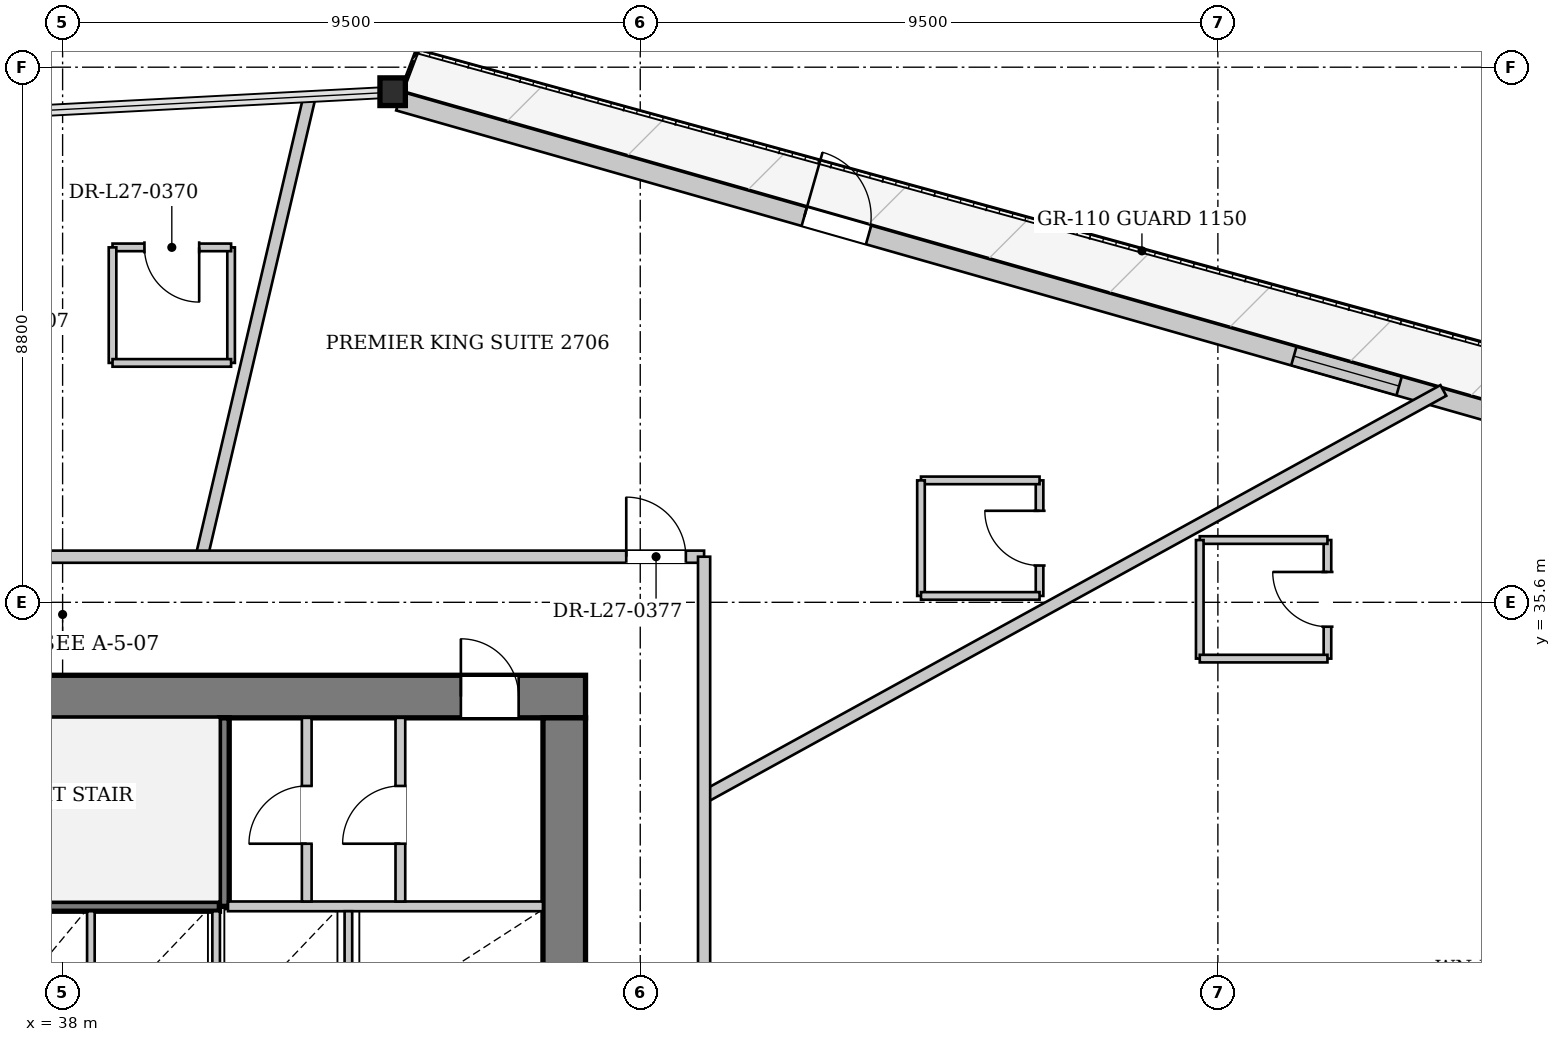
"""IFC4 building model, lengths in metres.
Left out: names, types, materials, properties, quantities, classifications, styles, units other than length and angle.
Written with IfcOpenShell. Run it as: python <this file> out.ifc"""

import sys

from ifc_helpers import new_model, si_unit, direction, frame, frame_2d, origin, origin_2d, place, context, subcontext, project, spatial, rectangle, i_section, extrude, source, transform, mapped, element, fill, save


model = new_model("IFC4")
c1 = context("Model", 3, precision=1e-05, world=origin(), true_north=direction((0.0, 1.0)))
c2 = subcontext(c1, "Body", "Model", "MODEL_VIEW")
j1 = project(units=[si_unit("LENGTHUNIT", "METRE"), si_unit("PLANEANGLEUNIT", "RADIAN")], contexts=[c1])
p1 = place(None, origin())
s1 = spatial("IfcSite", under=j1, at=p1, CompositionType="ELEMENT")
p2 = place(p1, origin())
s2 = spatial("IfcBuilding", under=s1, at=p2, CompositionType="ELEMENT")
p3 = place(p2, frame((0.0, 0.0, 105.7)))
s3 = spatial("IfcBuildingStorey", under=s2, at=p3, CompositionType="ELEMENT", Elevation=105.7)
m1 = source(origin(), c2, "Body", "SweptSolid", [
    extrude(i_section(OverallWidth=0.418, OverallDepth=0.455, WebThickness=0.038, FlangeThickness=0.059, at=origin_2d()), origin(), (0.0, 0.0, 1.0), 3.397),
])
p4 = place(p3, frame((43.573, 43.997, 0.0), z_axis=(-0.085727236226, 0.000143717077, 0.996318633929), x_axis=(-0.001676443579, -0.999998594767, 0.0)))
e1 = element("IfcColumn", 1, at=p4, inside=s3, PredefinedType="COLUMN", context=c2, shape_type="MappedRepresentation", body=[
    mapped(m1, transform((0.0, 0.0, 0.0), x_axis=(1.0, 0.0, 0.0), y_axis=(0.0, 1.0, 0.0), z_axis=(0.0, 0.0, 1.0), scale=1.0)),
])
p5 = place(p3, frame((43.53, 43.843, 0.0), z_axis=(0.0, 0.0, 1.0), x_axis=(0.961735223094, -0.273980584458, 0.0)))
e2 = element("IfcWall", 2, at=p5, inside=s3, PredefinedType="SOLIDWALL", context=c2, shape_type="SweptSolid", body=[
    extrude(rectangle(XDim=23.385, YDim=0.32, at=frame_2d((11.692, 0.0))), origin(), (0.0, 0.0, 1.0), 2.692),
])
p6 = place(p5, frame((6.933, 0.0, 0.0)))
e3 = element("IfcOpeningElement", 3, at=p6, cuts=e2, PredefinedType="OPENING", context=c2, shape_type="SweptSolid", body=[
    extrude(rectangle(XDim=1.1, YDim=2.3, at=frame_2d((0.55, 1.15))), frame((0.0, 0.17, 0.0), z_axis=(0.0, -1.0, 0.0), x_axis=(1.0, 0.0, 0.0)), (0.0, 0.0, 1.0), 0.34),
])
p7 = place(p5, frame((15.305, 0.0, 0.372)))
e4 = element("IfcOpeningElement", 4, at=p7, cuts=e2, PredefinedType="OPENING", context=c2, shape_type="SweptSolid", body=[
    extrude(rectangle(XDim=1.8, YDim=2.2, at=frame_2d((0.9, 1.1))), frame((0.0, 0.17, 0.0), z_axis=(0.0, -1.0, 0.0), x_axis=(1.0, 0.0, 0.0)), (0.0, 0.0, 1.0), 0.34),
])
p8 = place(p3, frame((67.109, 33.873, 0.0), z_axis=(0.0, 0.0, 1.0), x_axis=(-0.640571779822, -0.767898297234, 0.0)))
e5 = element("IfcWall", 5, at=p8, inside=s3, PredefinedType="SOLIDWALL", context=c2, shape_type="SweptSolid", body=[
    extrude(rectangle(XDim=23.985, YDim=0.38, at=frame_2d((11.993, 0.0))), origin(), (0.0, 0.0, 1.0), 2.692),
])
p9 = place(p8, frame((5.616, 0.0, 0.322)))
e6 = element("IfcOpeningElement", 6, at=p9, cuts=e5, PredefinedType="OPENING", context=c2, shape_type="SweptSolid", body=[
    extrude(rectangle(XDim=2.2, YDim=2.25, at=frame_2d((1.1, 1.125))), frame((0.0, 0.2, 0.0), z_axis=(0.0, -1.0, 0.0), x_axis=(1.0, 0.0, 0.0)), (0.0, 0.0, 1.0), 0.4),
])
p10 = place(p8, frame((16.169, 0.0, 0.322)))
e7 = element("IfcOpeningElement", 7, at=p10, cuts=e5, PredefinedType="OPENING", context=c2, shape_type="SweptSolid", body=[
    extrude(rectangle(XDim=2.2, YDim=2.25, at=frame_2d((1.1, 1.125))), frame((0.0, 0.2, 0.0), z_axis=(0.0, -1.0, 0.0), x_axis=(1.0, 0.0, 0.0)), (0.0, 0.0, 1.0), 0.4),
])
p11 = place(p3, frame((29.4, 34.05, 0.0), z_axis=(0.0, 0.0, 1.0), x_axis=(1.0, 0.0, 0.0)))
e8 = element("IfcWall", 8, at=p11, inside=s3, PredefinedType="SHEAR", context=c2, shape_type="SweptSolid", body=[
    extrude(rectangle(XDim=17.2, YDim=0.7, at=frame_2d((8.6, 0.0))), origin(), (0.0, 0.0, 1.0), 3.3),
])
p12 = place(p11, frame((1.7, 0.0, 0.0)))
e9 = element("IfcOpeningElement", 9, at=p12, cuts=e8, PredefinedType="OPENING", context=c2, shape_type="SweptSolid", body=[
    extrude(rectangle(XDim=0.95, YDim=2.1, at=frame_2d((0.475, 1.05))), frame((0.0, 0.36, 0.0), z_axis=(0.0, -1.0, 0.0), x_axis=(1.0, 0.0, 0.0)), (0.0, 0.0, 1.0), 0.72),
])
p13 = place(p11, frame((4.08, 0.0, 0.0)))
e10 = element("IfcOpeningElement", 10, at=p13, cuts=e8, PredefinedType="OPENING", context=c2, shape_type="SweptSolid", body=[
    extrude(rectangle(XDim=1.32, YDim=2.2, at=frame_2d((0.66, 1.1))), frame((0.0, 0.36, 0.0), z_axis=(0.0, -1.0, 0.0), x_axis=(1.0, 0.0, 0.0)), (0.0, 0.0, 1.0), 0.72),
])
p14 = place(p11, frame((15.15, 0.0, 0.0)))
e11 = element("IfcOpeningElement", 11, at=p14, cuts=e8, PredefinedType="OPENING", context=c2, shape_type="SweptSolid", body=[
    extrude(rectangle(XDim=0.95, YDim=2.1, at=frame_2d((0.475, 1.05))), frame((0.0, 0.36, 0.0), z_axis=(0.0, -1.0, 0.0), x_axis=(1.0, 0.0, 0.0)), (0.0, 0.0, 1.0), 0.72),
])
p15 = place(p3, frame((46.25, 33.7, 0.0), z_axis=(0.0, 0.0, 1.0), x_axis=(0.0, -1.0, 0.0)))
e12 = element("IfcWall", 12, at=p15, inside=s3, PredefinedType="SHEAR", context=c2, shape_type="SweptSolid", body=[
    extrude(rectangle(XDim=14.2, YDim=0.7, at=frame_2d((7.1, 0.0))), origin(), (0.0, 0.0, 1.0), 3.3),
])
p16 = place(p15, frame((5.18, 0.0, 0.0)))
e13 = element("IfcOpeningElement", 13, at=p16, cuts=e12, PredefinedType="OPENING", context=c2, shape_type="SweptSolid", body=[
    extrude(rectangle(XDim=1.6, YDim=2.2, at=frame_2d((0.8, 1.1))), frame((0.0, 0.36, 0.0), z_axis=(0.0, -1.0, 0.0), x_axis=(1.0, 0.0, 0.0)), (0.0, 0.0, 1.0), 0.72),
])
p17 = place(p3, frame((33.28, 30.6, 0.0), z_axis=(0.0, 0.0, 1.0), x_axis=(1.0, 0.0, 0.0)))
e14 = element("IfcWall", 14, at=p17, inside=s3, PredefinedType="PARTITIONING", context=c2, shape_type="SweptSolid", body=[
    extrude(rectangle(XDim=7.3, YDim=0.16, at=frame_2d((3.65, 0.0))), origin(), (0.0, 0.0, 1.0), 3.3),
])
p18 = place(p3, frame((40.66, 30.6, 0.0), z_axis=(0.0, 0.0, 1.0), x_axis=(0.0, 1.0, 0.0)))
e15 = element("IfcWall", 15, at=p18, inside=s3, PredefinedType="PARTITIONING", context=c2, shape_type="SweptSolid", body=[
    extrude(rectangle(XDim=3.1, YDim=0.16, at=frame_2d((1.55, 0.0))), origin(), (0.0, 0.0, 1.0), 3.3),
])
p19 = place(p3, frame((40.72, 30.6, 0.0), z_axis=(0.0, 0.0, 1.0), x_axis=(1.0, 0.0, 0.0)))
e16 = element("IfcWall", 16, at=p19, inside=s3, PredefinedType="PARTITIONING", context=c2, shape_type="SweptSolid", body=[
    extrude(rectangle(XDim=5.18, YDim=0.16, at=frame_2d((2.59, 0.0))), origin(), (0.0, 0.0, 1.0), 3.3),
])
for number, where, z_axis, x_axis in (
    (17, (38.465, 28.6, 0.0), (0.0, 0.0, 1.0), (0.0, 1.0, 0.0)),
    (18, (40.525, 28.6, 0.0), (0.0, 0.0, 1.0), (0.0, 1.0, 0.0)),
    (19, (42.7, 28.6, 0.0), (0.0, 0.0, 1.0), (0.0, 1.0, 0.0)),
):
    element("IfcWall", number, at=place(p3, frame(where, z_axis=z_axis, x_axis=x_axis)), inside=s3, PredefinedType="PARTITIONING", context=c2, shape_type="SweptSolid", body=[
        extrude(rectangle(XDim=1.92, YDim=0.125, at=frame_2d((0.96, 0.0))), origin(), (0.0, 0.0, 1.0), 3.3),
    ])
p20 = place(p3, frame((42.015, 30.68, 0.0), z_axis=(0.0, 0.0, 1.0), x_axis=(0.0, 1.0, 0.0)))
e20 = element("IfcWall", 20, at=p20, inside=s3, PredefinedType="PARTITIONING", context=c2, shape_type="SweptSolid", body=[
    extrude(rectangle(XDim=3.02, YDim=0.16, at=frame_2d((1.51, 0.0))), origin(), (0.0, 0.0, 1.0), 3.3),
])
p21 = place(p20, frame((0.95, 0.0, 0.0)))
e21 = element("IfcOpeningElement", 21, at=p21, cuts=e20, PredefinedType="OPENING", context=c2, shape_type="SweptSolid", body=[
    extrude(rectangle(XDim=0.95, YDim=2.1, at=frame_2d((0.475, 1.05))), frame((0.0, 0.09, 0.0), z_axis=(0.0, -1.0, 0.0), x_axis=(1.0, 0.0, 0.0)), (0.0, 0.0, 1.0), 0.18),
])
p22 = place(p3, frame((43.555, 30.68, 0.0), z_axis=(0.0, 0.0, 1.0), x_axis=(0.0, 1.0, 0.0)))
e22 = element("IfcWall", 22, at=p22, inside=s3, PredefinedType="PARTITIONING", context=c2, shape_type="SweptSolid", body=[
    extrude(rectangle(XDim=3.02, YDim=0.16, at=frame_2d((1.51, 0.0))), origin(), (0.0, 0.0, 1.0), 3.3),
])
p23 = place(p22, frame((0.95, 0.0, 0.0)))
e23 = element("IfcOpeningElement", 23, at=p23, cuts=e22, PredefinedType="OPENING", context=c2, shape_type="SweptSolid", body=[
    extrude(rectangle(XDim=0.95, YDim=2.1, at=frame_2d((0.475, 1.05))), frame((0.0, 0.09, 0.0), z_axis=(0.0, -1.0, 0.0), x_axis=(1.0, 0.0, 0.0)), (0.0, 0.0, 1.0), 0.18),
])
p24 = place(p3, frame((48.55, 32.4, 0.0), z_axis=(0.0, 0.0, 1.0), x_axis=(0.87630505822, 0.481756624176, 0.0)))
e24 = element("IfcWall", 24, at=p24, inside=s3, PredefinedType="PARTITIONING", context=c2, shape_type="SweptSolid", body=[
    extrude(rectangle(XDim=13.875, YDim=0.2, at=frame_2d((6.937, 0.0))), origin(), (0.0, 0.0, 1.0), 3.3),
])
p25 = place(p3, frame((40.287, 36.35, 0.0), z_axis=(0.0, 0.0, 1.0), x_axis=(0.22833612857, 0.973582360353, 0.0)))
e25 = element("IfcWall", 25, at=p25, inside=s3, PredefinedType="PARTITIONING", context=c2, shape_type="SweptSolid", body=[
    extrude(rectangle(XDim=7.741, YDim=0.2, at=frame_2d((3.871, 0.0))), origin(), (0.0, 0.0, 1.0), 3.3),
])
p26 = place(p3, frame((58.802, 34.674, 0.0), z_axis=(0.0, 0.0, 1.0), x_axis=(0.0, 1.0, 0.0)))
e26 = element("IfcWall", 26, at=p26, inside=s3, PredefinedType="PARTITIONING", context=c2, shape_type="SweptSolid", body=[
    extrude(rectangle(XDim=1.95, YDim=0.125, at=frame_2d((0.975, 0.0))), origin(), (0.0, 0.0, 1.0), 3.3),
])
p27 = place(p26, frame((0.525, 0.0, 0.0)))
e27 = element("IfcOpeningElement", 27, at=p27, cuts=e26, PredefinedType="OPENING", context=c2, shape_type="SweptSolid", body=[
    extrude(rectangle(XDim=0.9, YDim=2.1, at=frame_2d((0.45, 1.05))), frame((0.0, 0.073, 0.0), z_axis=(0.0, -1.0, 0.0), x_axis=(1.0, 0.0, 0.0)), (0.0, 0.0, 1.0), 0.145),
])
p28 = place(p3, frame((58.802, 36.624, 0.0), z_axis=(0.0, 0.0, 1.0), x_axis=(-1.0, 0.0, 0.0)))
e28 = element("IfcWall", 28, at=p28, inside=s3, PredefinedType="PARTITIONING", context=c2, shape_type="SweptSolid", body=[
    extrude(rectangle(XDim=2.1, YDim=0.125, at=frame_2d((1.05, 0.0))), origin(), (0.0, 0.0, 1.0), 3.3),
])
p29 = place(p3, frame((56.702, 36.624, 0.0), z_axis=(0.0, 0.0, 1.0), x_axis=(0.0, -1.0, 0.0)))
e29 = element("IfcWall", 29, at=p29, inside=s3, PredefinedType="PARTITIONING", context=c2, shape_type="SweptSolid", body=[
    extrude(rectangle(XDim=1.95, YDim=0.125, at=frame_2d((0.975, 0.0))), origin(), (0.0, 0.0, 1.0), 3.3),
])
p30 = place(p3, frame((56.702, 34.674, 0.0), z_axis=(0.0, 0.0, 1.0), x_axis=(1.0, 0.0, 0.0)))
e30 = element("IfcWall", 30, at=p30, inside=s3, PredefinedType="PARTITIONING", context=c2, shape_type="SweptSolid", body=[
    extrude(rectangle(XDim=2.1, YDim=0.125, at=frame_2d((1.05, 0.0))), origin(), (0.0, 0.0, 1.0), 2.795),
])
p31 = place(p3, frame((54.067, 35.705, 0.0), z_axis=(0.0, 0.0, 1.0), x_axis=(0.0, 1.0, 0.0)))
e31 = element("IfcWall", 31, at=p31, inside=s3, PredefinedType="PARTITIONING", context=c2, shape_type="SweptSolid", body=[
    extrude(rectangle(XDim=1.9, YDim=0.125, at=frame_2d((0.95, 0.0))), origin(), (0.0, 0.0, 1.0), 3.3),
])
p32 = place(p31, frame((0.5, 0.0, 0.0)))
e32 = element("IfcOpeningElement", 32, at=p32, cuts=e31, PredefinedType="OPENING", context=c2, shape_type="SweptSolid", body=[
    extrude(rectangle(XDim=0.9, YDim=2.1, at=frame_2d((0.45, 1.05))), frame((0.0, 0.073, 0.0), z_axis=(0.0, -1.0, 0.0), x_axis=(1.0, 0.0, 0.0)), (0.0, 0.0, 1.0), 0.145),
])
p33 = place(p3, frame((54.067, 37.605, 0.0), z_axis=(0.0, 0.0, 1.0), x_axis=(-1.0, 0.0, 0.0)))
e33 = element("IfcWall", 33, at=p33, inside=s3, PredefinedType="PARTITIONING", context=c2, shape_type="SweptSolid", body=[
    extrude(rectangle(XDim=1.95, YDim=0.125, at=frame_2d((0.975, 0.0))), origin(), (0.0, 0.0, 1.0), 3.3),
])
p34 = place(p3, frame((52.117, 37.605, 0.0), z_axis=(0.0, 0.0, 1.0), x_axis=(0.0, -1.0, 0.0)))
e34 = element("IfcWall", 34, at=p34, inside=s3, PredefinedType="PARTITIONING", context=c2, shape_type="SweptSolid", body=[
    extrude(rectangle(XDim=1.9, YDim=0.125, at=frame_2d((0.95, 0.0))), origin(), (0.0, 0.0, 1.0), 3.3),
])
p35 = place(p3, frame((52.117, 35.705, 0.0), z_axis=(0.0, 0.0, 1.0), x_axis=(1.0, 0.0, 0.0)))
e35 = element("IfcWall", 35, at=p35, inside=s3, PredefinedType="PARTITIONING", context=c2, shape_type="SweptSolid", body=[
    extrude(rectangle(XDim=1.95, YDim=0.125, at=frame_2d((0.975, 0.0))), origin(), (0.0, 0.0, 1.0), 3.3),
])
p36 = place(p3, frame((40.771, 39.537, 0.0), z_axis=(0.0, 0.0, 1.0), x_axis=(0.0, 1.0, 0.0)))
e36 = element("IfcWall", 36, at=p36, inside=s3, PredefinedType="PARTITIONING", context=c2, shape_type="SweptSolid", body=[
    extrude(rectangle(XDim=1.9, YDim=0.125, at=frame_2d((0.95, 0.0))), origin(), (0.0, 0.0, 1.0), 3.3),
])
p37 = place(p3, frame((40.771, 41.437, 0.0), z_axis=(0.0, 0.0, 1.0), x_axis=(-1.0, 0.0, 0.0)))
e37 = element("IfcWall", 37, at=p37, inside=s3, PredefinedType="PARTITIONING", context=c2, shape_type="SweptSolid", body=[
    extrude(rectangle(XDim=1.95, YDim=0.125, at=frame_2d((0.975, 0.0))), origin(), (0.0, 0.0, 1.0), 3.3),
])
p38 = place(p37, frame((0.525, 0.0, 0.0)))
e38 = element("IfcOpeningElement", 38, at=p38, cuts=e37, PredefinedType="OPENING", context=c2, shape_type="SweptSolid", body=[
    extrude(rectangle(XDim=0.9, YDim=2.1, at=frame_2d((0.45, 1.05))), frame((0.0, 0.073, 0.0), z_axis=(0.0, -1.0, 0.0), x_axis=(1.0, 0.0, 0.0)), (0.0, 0.0, 1.0), 0.145),
])
p39 = place(p3, frame((38.821, 41.437, 0.0), z_axis=(0.0, 0.0, 1.0), x_axis=(0.0, -1.0, 0.0)))
e39 = element("IfcWall", 39, at=p39, inside=s3, PredefinedType="PARTITIONING", context=c2, shape_type="SweptSolid", body=[
    extrude(rectangle(XDim=1.9, YDim=0.125, at=frame_2d((0.95, 0.0))), origin(), (0.0, 0.0, 1.0), 3.3),
])
p40 = place(p3, frame((38.821, 39.537, 0.0), z_axis=(0.0, 0.0, 1.0), x_axis=(1.0, 0.0, 0.0)))
e40 = element("IfcWall", 40, at=p40, inside=s3, PredefinedType="PARTITIONING", context=c2, shape_type="SweptSolid", body=[
    extrude(rectangle(XDim=1.95, YDim=0.125, at=frame_2d((0.975, 0.0))), origin(), (0.0, 0.0, 1.0), 3.3),
])
p41 = place(p3, frame((27.45, 36.35, 0.0), z_axis=(0.0, 0.0, 1.0), x_axis=(1.0, 0.0, 0.0)))
e41 = element("IfcWall", 41, at=p41, inside=s3, PredefinedType="PARTITIONING", context=c2, shape_type="SweptSolid", body=[
    extrude(rectangle(XDim=21.1, YDim=0.2, at=frame_2d((10.55, 0.0))), origin(), (0.0, 0.0, 1.0), 3.3),
])
p42 = place(p41, frame((19.82, 0.0, 0.0)))
e42 = element("IfcOpeningElement", 42, at=p42, cuts=e41, PredefinedType="OPENING", context=c2, shape_type="SweptSolid", body=[
    extrude(rectangle(XDim=0.98, YDim=2.15, at=frame_2d((0.49, 1.075))), frame((0.0, 0.11, 0.0), z_axis=(0.0, -1.0, 0.0), x_axis=(1.0, 0.0, 0.0)), (0.0, 0.0, 1.0), 0.22),
])
p43 = place(p41, frame((5.605, 0.0, 0.0)))
e43 = element("IfcOpeningElement", 43, at=p43, cuts=e41, PredefinedType="OPENING", context=c2, shape_type="SweptSolid", body=[
    extrude(rectangle(XDim=0.98, YDim=2.15, at=frame_2d((0.49, 1.075))), frame((0.0, 0.11, 0.0), z_axis=(0.0, -1.0, 0.0), x_axis=(1.0, 0.0, 0.0)), (0.0, 0.0, 1.0), 0.22),
])
p44 = place(p3, frame((48.55, 16.85, 0.0), z_axis=(0.0, 0.0, 1.0), x_axis=(0.0, 1.0, 0.0)))
e44 = element("IfcWall", 44, at=p44, inside=s3, PredefinedType="PARTITIONING", context=c2, shape_type="SweptSolid", body=[
    extrude(rectangle(XDim=19.5, YDim=0.2, at=frame_2d((9.75, 0.0))), origin(), (0.0, 0.0, 1.0), 3.3),
])
p45 = place(p44, frame((1.869, 0.0, 0.0)))
e45 = element("IfcOpeningElement", 45, at=p45, cuts=e44, PredefinedType="OPENING", context=c2, shape_type="SweptSolid", body=[
    extrude(rectangle(XDim=0.98, YDim=2.15, at=frame_2d((0.49, 1.075))), frame((0.0, 0.11, 0.0), z_axis=(0.0, -1.0, 0.0), x_axis=(1.0, 0.0, 0.0)), (0.0, 0.0, 1.0), 0.22),
])
p46 = place(p44, frame((11.325, 0.0, 0.0)))
e46 = element("IfcOpeningElement", 46, at=p46, cuts=e44, PredefinedType="OPENING", context=c2, shape_type="SweptSolid", body=[
    extrude(rectangle(XDim=0.98, YDim=2.15, at=frame_2d((0.49, 1.075))), frame((0.0, 0.11, 0.0), z_axis=(0.0, -1.0, 0.0), x_axis=(1.0, 0.0, 0.0)), (0.0, 0.0, 1.0), 0.22),
])
m2 = source(origin(), c2, "Body", "SweptSolid", [
    extrude(rectangle(XDim=1.1, YDim=2.3, at=frame_2d((0.55, 1.15))), frame((0.0, 0.025, 0.0), z_axis=(0.0, -1.0, 0.0), x_axis=(1.0, 0.0, 0.0)), (0.0, 0.0, 1.0), 0.05),
])
p47 = place(p6, origin())
e47 = element("IfcDoor", 47, at=p47, inside=s3, OperationType="SINGLE_SWING_LEFT", PredefinedType="DOOR", context=c2, shape_type="MappedRepresentation", body=[
    mapped(m2, transform((0.0, 0.0, 0.0), x_axis=(1.0, 0.0, 0.0), y_axis=(0.0, 1.0, 0.0), z_axis=(0.0, 0.0, 1.0), scale=1.0)),
])
fill(e3, e47)
m3 = source(origin(), c2, "Body", "SweptSolid", [
    extrude(rectangle(XDim=1.8, YDim=2.2, at=frame_2d((0.9, 1.1))), frame((0.0, 0.03, 0.0), z_axis=(0.0, -1.0, 0.0), x_axis=(1.0, 0.0, 0.0)), (0.0, 0.0, 1.0), 0.06),
])
p48 = place(p7, origin())
e48 = element("IfcWindow", 48, at=p48, inside=s3, PartitioningType="SINGLE_PANEL", PredefinedType="WINDOW", context=c2, shape_type="MappedRepresentation", body=[
    mapped(m3, transform((0.0, 0.0, 0.0), x_axis=(1.0, 0.0, 0.0), y_axis=(0.0, 1.0, 0.0), z_axis=(0.0, 0.0, 1.0), scale=1.0)),
])
fill(e4, e48)
m4 = source(origin(), c2, "Body", "SweptSolid", [
    extrude(rectangle(XDim=0.95, YDim=2.1, at=frame_2d((0.475, 1.05))), frame((0.0, 0.025, 0.0), z_axis=(0.0, -1.0, 0.0), x_axis=(1.0, 0.0, 0.0)), (0.0, 0.0, 1.0), 0.05),
])
p49 = place(p21, origin())
e49 = element("IfcDoor", 49, at=p49, inside=s3, OperationType="SINGLE_SWING_LEFT", PredefinedType="DOOR", context=c2, shape_type="MappedRepresentation", body=[
    mapped(m4, transform((0.0, 0.0, 0.0), x_axis=(1.0, 0.0, 0.0), y_axis=(0.0, 1.0, 0.0), z_axis=(0.0, 0.0, 1.0), scale=1.0)),
])
fill(e21, e49)
p50 = place(p23, origin())
e50 = element("IfcDoor", 50, at=p50, inside=s3, OperationType="SINGLE_SWING_LEFT", PredefinedType="DOOR", context=c2, shape_type="MappedRepresentation", body=[
    mapped(m4, transform((0.0, 0.0, 0.0), x_axis=(1.0, 0.0, 0.0), y_axis=(0.0, 1.0, 0.0), z_axis=(0.0, 0.0, 1.0), scale=1.0)),
])
fill(e23, e50)
p51 = place(p14, origin())
e51 = element("IfcDoor", 51, at=p51, inside=s3, OperationType="SINGLE_SWING_LEFT", PredefinedType="DOOR", context=c2, shape_type="MappedRepresentation", body=[
    mapped(m4, transform((0.0, 0.0, 0.0), x_axis=(1.0, 0.0, 0.0), y_axis=(0.0, 1.0, 0.0), z_axis=(0.0, 0.0, 1.0), scale=1.0)),
])
fill(e11, e51)
m5 = source(origin(), c2, "Body", "SweptSolid", [
    extrude(rectangle(XDim=0.9, YDim=2.1, at=frame_2d((0.45, 1.05))), frame((0.0, 0.025, 0.0), z_axis=(0.0, -1.0, 0.0), x_axis=(1.0, 0.0, 0.0)), (0.0, 0.0, 1.0), 0.05),
])
p52 = place(p27, origin())
e52 = element("IfcDoor", 52, at=p52, inside=s3, OperationType="SINGLE_SWING_RIGHT", PredefinedType="DOOR", context=c2, shape_type="MappedRepresentation", body=[
    mapped(m5, transform((0.0, 0.0, 0.0), x_axis=(1.0, 0.0, 0.0), y_axis=(0.0, 1.0, 0.0), z_axis=(0.0, 0.0, 1.0), scale=1.0)),
])
fill(e27, e52)
p53 = place(p32, origin())
e53 = element("IfcDoor", 53, at=p53, inside=s3, OperationType="SINGLE_SWING_RIGHT", PredefinedType="DOOR", context=c2, shape_type="MappedRepresentation", body=[
    mapped(m5, transform((0.0, 0.0, 0.0), x_axis=(1.0, 0.0, 0.0), y_axis=(0.0, 1.0, 0.0), z_axis=(0.0, 0.0, 1.0), scale=1.0)),
])
fill(e32, e53)
p54 = place(p38, origin())
e54 = element("IfcDoor", 54, at=p54, inside=s3, OperationType="SINGLE_SWING_LEFT", PredefinedType="DOOR", context=c2, shape_type="MappedRepresentation", body=[
    mapped(m5, transform((0.0, 0.0, 0.0), x_axis=(1.0, 0.0, 0.0), y_axis=(0.0, 1.0, 0.0), z_axis=(0.0, 0.0, 1.0), scale=1.0)),
])
fill(e38, e54)
m6 = source(origin(), c2, "Body", "SweptSolid", [
    extrude(rectangle(XDim=0.98, YDim=2.15, at=frame_2d((0.49, 1.075))), frame((0.0, 0.025, 0.0), z_axis=(0.0, -1.0, 0.0), x_axis=(1.0, 0.0, 0.0)), (0.0, 0.0, 1.0), 0.05),
])
p55 = place(p42, origin())
e55 = element("IfcDoor", 55, at=p55, inside=s3, OperationType="SINGLE_SWING_LEFT", PredefinedType="DOOR", context=c2, shape_type="MappedRepresentation", body=[
    mapped(m6, transform((0.0, 0.0, 0.0), x_axis=(1.0, 0.0, 0.0), y_axis=(0.0, 1.0, 0.0), z_axis=(0.0, 0.0, 1.0), scale=1.0)),
])
fill(e42, e55)
save(model, sys.argv[1])
